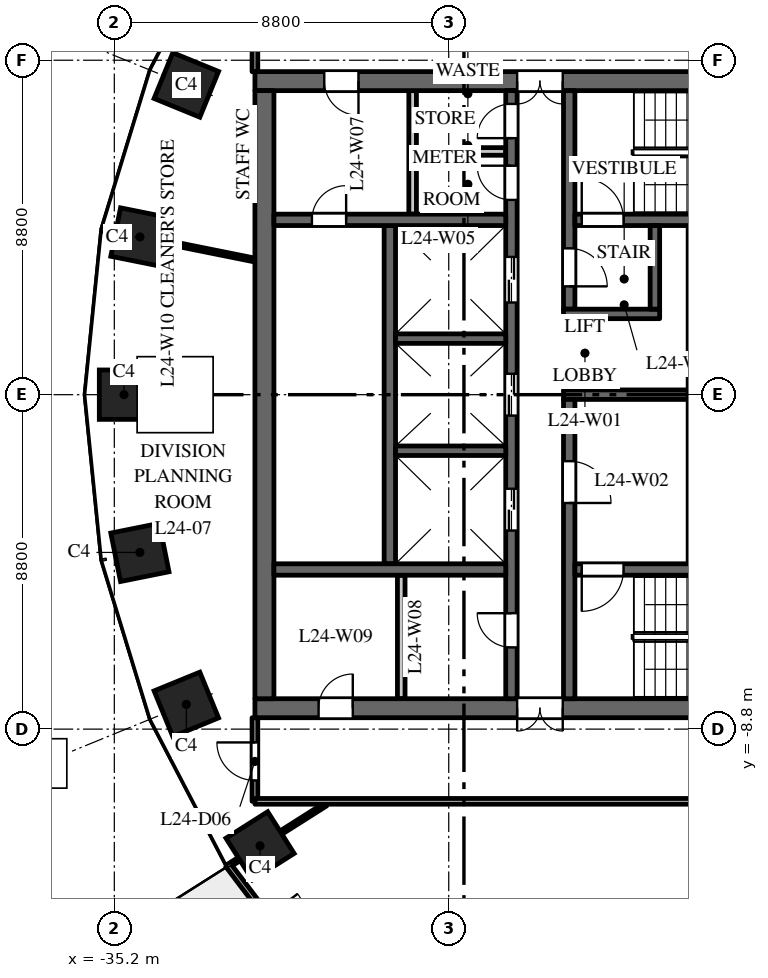
"""IFC4 building model, lengths in metres.
Left out: names, types, materials, properties, quantities, classifications, styles, units other than length and angle.
Written with IfcOpenShell. Run it as: python <this file> out.ifc"""

import sys

from ifc_helpers import new_model, si_unit, direction, frame, frame_2d, origin, origin_2d, place, context, subcontext, project, spatial, rectangle, extrude, element, fill, save


model = new_model("IFC4")
c1 = context("Model", 3, precision=1e-05, world=origin(), true_north=direction((0.0, 1.0)))
c2 = subcontext(c1, "Body", "Model", "MODEL_VIEW")
j1 = project(units=[si_unit("LENGTHUNIT", "METRE"), si_unit("PLANEANGLEUNIT", "RADIAN")], contexts=[c1])
p1 = place(None, origin())
s1 = spatial("IfcSite", under=j1, at=p1, CompositionType="ELEMENT")
p2 = place(p1, origin())
s2 = spatial("IfcBuilding", under=s1, at=p2, CompositionType="ELEMENT")
p3 = place(p2, frame((0.0, 0.0, 108.0)))
s3 = spatial("IfcBuildingStorey", under=s2, at=p3, CompositionType="ELEMENT", Elevation=108.0)
for number, where, z_axis, x_axis in (
    (1, (-33.305, 8.149, 0.0), (0.0, 0.0, 1.0), (-0.379, -0.925, 0.0)),
    (2, (-34.527, 4.151, 0.0), (0.0, 0.0, 1.0), (-0.197, -0.98, 0.0)),
    (3, (-34.945, 0.0, 0.0), (0.0, 0.0, 1.0), (0.0, -1.0, 0.0)),
    (4, (-34.527, -4.151, 0.0), (0.0, 0.0, 1.0), (0.197, -0.98, 0.0)),
    (5, (-33.305, -8.149, 0.0), (0.0, 0.0, 1.0), (0.379, -0.925, 0.0)),
    (6, (-31.365, -11.871, 0.0), (0.0, 0.0, 1.0), (0.535, -0.845, 0.0)),
):
    element("IfcColumn", number, at=place(p3, frame(where, z_axis=z_axis, x_axis=x_axis)), inside=s3, PredefinedType="COLUMN", context=c2, shape_type="SweptSolid", body=[
        extrude(rectangle(XDim=1.3, YDim=1.3, at=origin_2d()), origin(), (0.0, 0.0, 1.0), 4.0),
    ])
p4 = place(p3, frame((-16.5, 8.25, 0.0), z_axis=(0.0, 0.0, 1.0), x_axis=(-1.0, 0.0, 0.0)))
e7 = element("IfcWall", 7, at=p4, inside=s3, PredefinedType="SHEAR", context=c2, shape_type="SweptSolid", body=[
    extrude(rectangle(XDim=15.0, YDim=0.5, at=frame_2d((7.5, 0.0))), origin(), (0.0, 0.0, 1.0), 3.7),
])
p5 = place(p4, frame((6.9, 0.0, 0.0)))
e8 = element("IfcOpeningElement", 8, at=p5, cuts=e7, PredefinedType="OPENING", context=c2, shape_type="SweptSolid", body=[
    extrude(rectangle(XDim=1.2, YDim=2.1, at=frame_2d((0.6, 1.05))), frame((0.0, 0.26, 0.0), z_axis=(0.0, -1.0, 0.0), x_axis=(1.0, 0.0, 0.0)), (0.0, 0.0, 1.0), 0.52),
])
p6 = place(p4, frame((12.275, 0.0, 0.0)))
e9 = element("IfcOpeningElement", 9, at=p6, cuts=e7, PredefinedType="OPENING", context=c2, shape_type="SweptSolid", body=[
    extrude(rectangle(XDim=0.9, YDim=2.1, at=frame_2d((0.45, 1.05))), frame((0.0, 0.26, 0.0), z_axis=(0.0, -1.0, 0.0), x_axis=(1.0, 0.0, 0.0)), (0.0, 0.0, 1.0), 0.52),
])
p7 = place(p3, frame((-16.5, -8.25, 0.0), z_axis=(0.0, 0.0, 1.0), x_axis=(-1.0, 0.0, 0.0)))
e10 = element("IfcWall", 10, at=p7, inside=s3, PredefinedType="SHEAR", context=c2, shape_type="SweptSolid", body=[
    extrude(rectangle(XDim=15.0, YDim=0.5, at=frame_2d((7.5, 0.0))), origin(), (0.0, 0.0, 1.0), 3.7),
])
p8 = place(p7, frame((6.9, 0.0, 0.0)))
e11 = element("IfcOpeningElement", 11, at=p8, cuts=e10, PredefinedType="OPENING", context=c2, shape_type="SweptSolid", body=[
    extrude(rectangle(XDim=1.2, YDim=2.1, at=frame_2d((0.6, 1.05))), frame((0.0, 0.26, 0.0), z_axis=(0.0, -1.0, 0.0), x_axis=(1.0, 0.0, 0.0)), (0.0, 0.0, 1.0), 0.52),
])
p9 = place(p7, frame((12.425, 0.0, 0.0)))
e12 = element("IfcOpeningElement", 12, at=p9, cuts=e10, PredefinedType="OPENING", context=c2, shape_type="SweptSolid", body=[
    extrude(rectangle(XDim=0.9, YDim=2.1, at=frame_2d((0.45, 1.05))), frame((0.0, 0.26, 0.0), z_axis=(0.0, -1.0, 0.0), x_axis=(1.0, 0.0, 0.0)), (0.0, 0.0, 1.0), 0.52),
])
p10 = place(p3, frame((-27.95, -4.45, 0.0), z_axis=(0.0, 0.0, 1.0), x_axis=(0.0, 1.0, 0.0)))
e13 = element("IfcWall", 13, at=p10, inside=s3, PredefinedType="SHEAR", context=c2, shape_type="SweptSolid", body=[
    extrude(rectangle(XDim=8.9, YDim=0.3, at=frame_2d((4.45, 0.0))), origin(), (0.0, 0.0, 1.0), 3.7),
])
p11 = place(p3, frame((-24.75, -8.0, 0.0), z_axis=(0.0, 0.0, 1.0), x_axis=(0.0, 1.0, 0.0)))
e14 = element("IfcWall", 14, at=p11, inside=s3, PredefinedType="SHEAR", context=c2, shape_type="SweptSolid", body=[
    extrude(rectangle(XDim=16.0, YDim=0.3, at=frame_2d((8.0, 0.0))), origin(), (0.0, 0.0, 1.0), 3.7),
])
p12 = place(p11, frame((4.425, 0.0, 0.0)))
e15 = element("IfcOpeningElement", 15, at=p12, cuts=e14, PredefinedType="OPENING", context=c2, shape_type="SweptSolid", body=[
    extrude(rectangle(XDim=1.1, YDim=2.1, at=frame_2d((0.55, 1.05))), frame((0.0, 0.16, 0.0), z_axis=(0.0, -1.0, 0.0), x_axis=(1.0, 0.0, 0.0)), (0.0, 0.0, 1.0), 0.32),
])
p13 = place(p11, frame((7.45, 0.0, 0.0)))
e16 = element("IfcOpeningElement", 16, at=p13, cuts=e14, PredefinedType="OPENING", context=c2, shape_type="SweptSolid", body=[
    extrude(rectangle(XDim=1.1, YDim=2.1, at=frame_2d((0.55, 1.05))), frame((0.0, 0.16, 0.0), z_axis=(0.0, -1.0, 0.0), x_axis=(1.0, 0.0, 0.0)), (0.0, 0.0, 1.0), 0.32),
])
p14 = place(p11, frame((10.425, 0.0, 0.0)))
e17 = element("IfcOpeningElement", 17, at=p14, cuts=e14, PredefinedType="OPENING", context=c2, shape_type="SweptSolid", body=[
    extrude(rectangle(XDim=1.2, YDim=2.1, at=frame_2d((0.6, 1.05))), frame((0.0, 0.16, 0.0), z_axis=(0.0, -1.0, 0.0), x_axis=(1.0, 0.0, 0.0)), (0.0, 0.0, 1.0), 0.32),
])
p15 = place(p11, frame((13.125, 0.0, 0.0)))
e18 = element("IfcOpeningElement", 18, at=p15, cuts=e14, PredefinedType="OPENING", context=c2, shape_type="SweptSolid", body=[
    extrude(rectangle(XDim=0.9, YDim=2.1, at=frame_2d((0.45, 1.05))), frame((0.0, 0.16, 0.0), z_axis=(0.0, -1.0, 0.0), x_axis=(1.0, 0.0, 0.0)), (0.0, 0.0, 1.0), 0.32),
])
p16 = place(p11, frame((14.75, 0.0, 0.0)))
e19 = element("IfcOpeningElement", 19, at=p16, cuts=e14, PredefinedType="OPENING", context=c2, shape_type="SweptSolid", body=[
    extrude(rectangle(XDim=0.9, YDim=2.1, at=frame_2d((0.45, 1.05))), frame((0.0, 0.16, 0.0), z_axis=(0.0, -1.0, 0.0), x_axis=(1.0, 0.0, 0.0)), (0.0, 0.0, 1.0), 0.32),
])
p17 = place(p11, frame((1.35, 0.0, 0.0)))
e20 = element("IfcOpeningElement", 20, at=p17, cuts=e14, PredefinedType="OPENING", context=c2, shape_type="SweptSolid", body=[
    extrude(rectangle(XDim=0.9, YDim=2.1, at=frame_2d((0.45, 1.05))), frame((0.0, 0.16, 0.0), z_axis=(0.0, -1.0, 0.0), x_axis=(1.0, 0.0, 0.0)), (0.0, 0.0, 1.0), 0.32),
])
p18 = place(p3, frame((-20.1, 0.0, 0.0), z_axis=(0.0, 0.0, 1.0), x_axis=(-1.0, 0.0, 0.0)))
e21 = element("IfcWall", 21, at=p18, inside=s3, PredefinedType="SHEAR", context=c2, shape_type="SweptSolid", body=[
    extrude(rectangle(XDim=3.28, YDim=0.25, at=frame_2d((1.64, 0.0))), origin(), (0.0, 0.0, 1.0), 3.7),
])
p19 = place(p3, frame((-31.25, -8.0, 0.0), z_axis=(0.0, 0.0, 1.0), x_axis=(0.0, 1.0, 0.0)))
e22 = element("IfcWall", 22, at=p19, inside=s3, PredefinedType="SHEAR", context=c2, shape_type="SweptSolid", body=[
    extrude(rectangle(XDim=16.0, YDim=0.5, at=frame_2d((8.0, 0.0))), origin(), (0.0, 0.0, 1.0), 3.7),
])
p20 = place(p3, frame((-24.9, 4.6, 0.0), z_axis=(0.0, 0.0, 1.0), x_axis=(-1.0, 0.0, 0.0)))
e23 = element("IfcWall", 23, at=p20, inside=s3, PredefinedType="SHEAR", context=c2, shape_type="SweptSolid", body=[
    extrude(rectangle(XDim=6.1, YDim=0.3, at=frame_2d((3.05, 0.0))), origin(), (0.0, 0.0, 1.0), 3.7),
])
p21 = place(p20, frame((4.2, 0.0, 0.0)))
e24 = element("IfcOpeningElement", 24, at=p21, cuts=e23, PredefinedType="OPENING", context=c2, shape_type="SweptSolid", body=[
    extrude(rectangle(XDim=0.9, YDim=2.1, at=frame_2d((0.45, 1.05))), frame((0.0, 0.16, 0.0), z_axis=(0.0, -1.0, 0.0), x_axis=(1.0, 0.0, 0.0)), (0.0, 0.0, 1.0), 0.32),
])
for number, where, z_axis, x_axis in (
    (25, (-27.35, 4.75, 0.0), (0.0, 0.0, 1.0), (0.0, 1.0, 0.0)),
    (26, (-27.65, -8.0, 0.0), (0.0, 0.0, 1.0), (0.0, 1.0, 0.0)),
):
    element("IfcWall", number, at=place(p3, frame(where, z_axis=z_axis, x_axis=x_axis)), inside=s3, PredefinedType="PARTITIONING", context=c2, shape_type="SweptSolid", body=[
        extrude(rectangle(XDim=3.25, YDim=0.2, at=frame_2d((1.625, 0.0))), origin(), (0.0, 0.0, 1.0), 3.7),
    ])
p22 = place(p3, frame((-24.9, 6.4, 0.0), z_axis=(0.0, 0.0, 1.0), x_axis=(-1.0, 0.0, 0.0)))
e27 = element("IfcWall", 27, at=p22, inside=s3, PredefinedType="PARTITIONING", context=c2, shape_type="SweptSolid", body=[
    extrude(rectangle(XDim=2.35, YDim=0.2, at=frame_2d((1.175, 0.0))), origin(), (0.0, 0.0, 1.0), 3.7),
])
p23 = place(p3, frame((-24.9, -4.6, 0.0), z_axis=(0.0, 0.0, 1.0), x_axis=(-1.0, 0.0, 0.0)))
e28 = element("IfcWall", 28, at=p23, inside=s3, PredefinedType="SHEAR", context=c2, shape_type="SweptSolid", body=[
    extrude(rectangle(XDim=6.1, YDim=0.3, at=frame_2d((3.05, 0.0))), origin(), (0.0, 0.0, 1.0), 3.7),
])
for number, where, z_axis, x_axis in (
    (29, (-24.9, -1.475, 0.0), (0.0, 0.0, 1.0), (-1.0, 0.0, 0.0)),
    (30, (-24.9, 1.475, 0.0), (0.0, 0.0, 1.0), (-1.0, 0.0, 0.0)),
):
    element("IfcWall", number, at=place(p3, frame(where, z_axis=z_axis, x_axis=x_axis)), inside=s3, PredefinedType="SHEAR", context=c2, shape_type="SweptSolid", body=[
        extrude(rectangle(XDim=2.9, YDim=0.25, at=frame_2d((1.45, 0.0))), origin(), (0.0, 0.0, 1.0), 3.7),
    ])
p24 = place(p3, frame((-23.23, 2.25, 0.0), z_axis=(0.0, 0.0, 1.0), x_axis=(0.0, 1.0, 0.0)))
e31 = element("IfcWall", 31, at=p24, inside=s3, PredefinedType="SHEAR", context=c2, shape_type="SweptSolid", body=[
    extrude(rectangle(XDim=5.75, YDim=0.3, at=frame_2d((2.875, 0.0))), origin(), (0.0, 0.0, 1.0), 3.7),
])
p25 = place(p24, frame((0.6, 0.0, 0.0)))
e32 = element("IfcOpeningElement", 32, at=p25, cuts=e31, PredefinedType="OPENING", context=c2, shape_type="SweptSolid", body=[
    extrude(rectangle(XDim=1.0, YDim=2.1, at=frame_2d((0.5, 1.05))), frame((0.0, 0.16, 0.0), z_axis=(0.0, -1.0, 0.0), x_axis=(1.0, 0.0, 0.0)), (0.0, 0.0, 1.0), 0.32),
])
p26 = place(p3, frame((-23.23, -8.0, 0.0), z_axis=(0.0, 0.0, 1.0), x_axis=(0.0, 1.0, 0.0)))
e33 = element("IfcWall", 33, at=p26, inside=s3, PredefinedType="SHEAR", context=c2, shape_type="SweptSolid", body=[
    extrude(rectangle(XDim=7.875, YDim=0.3, at=frame_2d((3.938, 0.0))), origin(), (0.0, 0.0, 1.0), 3.7),
])
p27 = place(p26, frame((5.15, 0.0, 0.0)))
e34 = element("IfcOpeningElement", 34, at=p27, cuts=e33, PredefinedType="OPENING", context=c2, shape_type="SweptSolid", body=[
    extrude(rectangle(XDim=1.1, YDim=2.1, at=frame_2d((0.55, 1.05))), frame((0.0, 0.16, 0.0), z_axis=(0.0, -1.0, 0.0), x_axis=(1.0, 0.0, 0.0)), (0.0, 0.0, 1.0), 0.32),
])
p28 = place(p3, frame((-16.9, 4.6, 0.0), z_axis=(0.0, 0.0, 1.0), x_axis=(-1.0, 0.0, 0.0)))
e35 = element("IfcWall", 35, at=p28, inside=s3, PredefinedType="SHEAR", context=c2, shape_type="SweptSolid", body=[
    extrude(rectangle(XDim=6.18, YDim=0.3, at=frame_2d((3.09, 0.0))), origin(), (0.0, 0.0, 1.0), 3.7),
])
p29 = place(p28, frame((4.9, 0.0, 0.0)))
e36 = element("IfcOpeningElement", 36, at=p29, cuts=e35, PredefinedType="OPENING", context=c2, shape_type="SweptSolid", body=[
    extrude(rectangle(XDim=1.1, YDim=2.1, at=frame_2d((0.55, 1.05))), frame((0.0, 0.16, 0.0), z_axis=(0.0, -1.0, 0.0), x_axis=(1.0, 0.0, 0.0)), (0.0, 0.0, 1.0), 0.32),
])
p30 = place(p3, frame((-16.9, -4.6, 0.0), z_axis=(0.0, 0.0, 1.0), x_axis=(-1.0, 0.0, 0.0)))
e37 = element("IfcWall", 37, at=p30, inside=s3, PredefinedType="SHEAR", context=c2, shape_type="SweptSolid", body=[
    extrude(rectangle(XDim=6.18, YDim=0.3, at=frame_2d((3.09, 0.0))), origin(), (0.0, 0.0, 1.0), 3.7),
])
p31 = place(p30, frame((4.9, 0.0, 0.0)))
e38 = element("IfcOpeningElement", 38, at=p31, cuts=e37, PredefinedType="OPENING", context=c2, shape_type="SweptSolid", body=[
    extrude(rectangle(XDim=1.1, YDim=2.1, at=frame_2d((0.55, 1.05))), frame((0.0, 0.16, 0.0), z_axis=(0.0, -1.0, 0.0), x_axis=(1.0, 0.0, 0.0)), (0.0, 0.0, 1.0), 0.32),
])
p32 = place(p3, frame((-20.85, 2.125, 0.0), z_axis=(0.0, 0.0, 1.0), x_axis=(-1.0, 0.0, 0.0)))
e39 = element("IfcWall", 39, at=p32, inside=s3, PredefinedType="SHEAR", context=c2, shape_type="SweptSolid", body=[
    extrude(rectangle(XDim=2.53, YDim=0.25, at=frame_2d((1.265, 0.0))), origin(), (0.0, 0.0, 1.0), 3.7),
])
p33 = place(p3, frame((-20.975, 2.25, 0.0), z_axis=(0.0, 0.0, 1.0), x_axis=(0.0, 1.0, 0.0)))
e40 = element("IfcWall", 40, at=p33, inside=s3, PredefinedType="SHEAR", context=c2, shape_type="SweptSolid", body=[
    extrude(rectangle(XDim=2.2, YDim=0.25, at=frame_2d((1.1, 0.0))), origin(), (0.0, 0.0, 1.0), 3.7),
])
p34 = place(p3, frame((-32.208, -12.374, 0.0), z_axis=(0.0, 0.0, 1.0), x_axis=(0.604045763106, -0.796949632081, 0.0)))
e41 = element("IfcWall", 41, at=p34, inside=s3, PredefinedType="STANDARD", context=c2, shape_type="SweptSolid", body=[
    extrude(rectangle(XDim=4.423, YDim=0.15, at=frame_2d((2.212, 0.0))), origin(), (0.0, 0.0, 1.0), 3.7),
])
p35 = place(p34, frame((1.712, 0.0, 0.0)))
e42 = element("IfcOpeningElement", 42, at=p35, cuts=e41, PredefinedType="OPENING", context=c2, shape_type="SweptSolid", body=[
    extrude(rectangle(XDim=1.0, YDim=2.4, at=frame_2d((0.5, 1.2))), frame((0.0, 0.085, 0.0), z_axis=(0.0, -1.0, 0.0), x_axis=(1.0, 0.0, 0.0)), (0.0, 0.0, 1.0), 0.17),
])
p36 = place(p3, frame((-35.512, 4.349, 0.0), z_axis=(0.0, 0.0, 1.0), x_axis=(0.980357474535, -0.197228857227, 0.0)))
e43 = element("IfcWall", 43, at=p36, inside=s3, PredefinedType="PARTITIONING", context=c2, shape_type="SweptSolid", body=[
    extrude(rectangle(XDim=4.092, YDim=0.1, at=frame_2d((2.046, 0.0))), origin(), (0.0, 0.0, 1.0), 3.2),
])
p37 = place(p3, frame((-32.212, -12.408, 0.0), z_axis=(0.0, 0.0, 1.0), x_axis=(0.844810627195, 0.535065420467, 0.0)))
e44 = element("IfcWall", 44, at=p37, inside=s3, PredefinedType="PARTITIONING", context=c2, shape_type="SweptSolid", body=[
    extrude(rectangle(XDim=3.048, YDim=0.1, at=frame_2d((1.524, 0.0))), origin(), (0.0, 0.0, 1.0), 3.7),
])
p38 = place(p3, frame((-31.5, -10.7, 0.0), z_axis=(0.0, 0.0, 1.0), x_axis=(0.0, 1.0, 0.0)))
e45 = element("IfcWall", 45, at=p38, inside=s3, PredefinedType="PARTITIONING", context=c2, shape_type="SweptSolid", body=[
    extrude(rectangle(XDim=2.2, YDim=0.15, at=frame_2d((1.1, 0.0))), origin(), (0.0, 0.0, 1.0), 3.7),
])
p39 = place(p38, frame((0.55, 0.0, 0.0)))
e46 = element("IfcOpeningElement", 46, at=p39, cuts=e45, PredefinedType="OPENING", context=c2, shape_type="SweptSolid", body=[
    extrude(rectangle(XDim=1.0, YDim=2.1, at=frame_2d((0.5, 1.05))), frame((0.0, 0.085, 0.0), z_axis=(0.0, -1.0, 0.0), x_axis=(1.0, 0.0, 0.0)), (0.0, 0.0, 1.0), 0.17),
])
p40 = place(p3, frame((-31.5, -10.7, 0.0), z_axis=(0.0, 0.0, 1.0), x_axis=(1.0, 0.0, 0.0)))
e47 = element("IfcWall", 47, at=p40, inside=s3, PredefinedType="PARTITIONING", context=c2, shape_type="SweptSolid", body=[
    extrude(rectangle(XDim=15.0, YDim=0.15, at=frame_2d((7.5, 0.0))), origin(), (0.0, 0.0, 1.0), 3.1),
])
p41 = place(p40, frame((13.379, 0.0, 0.0)))
e48 = element("IfcOpeningElement", 48, at=p41, cuts=e47, PredefinedType="OPENING", context=c2, shape_type="SweptSolid", body=[
    extrude(rectangle(XDim=1.0, YDim=2.1, at=frame_2d((0.5, 1.05))), frame((0.0, 0.085, 0.0), z_axis=(0.0, -1.0, 0.0), x_axis=(1.0, 0.0, 0.0)), (0.0, 0.0, 1.0), 0.17),
])
p42 = place(p3, frame((-31.5, 8.5, 0.0), z_axis=(0.0, 0.0, 1.0), x_axis=(0.0, 1.0, 0.0)))
e49 = element("IfcWall", 49, at=p42, inside=s3, PredefinedType="PARTITIONING", context=c2, shape_type="SweptSolid", body=[
    extrude(rectangle(XDim=2.2, YDim=0.15, at=frame_2d((1.1, 0.0))), origin(), (0.0, 0.0, 1.0), 3.7),
])
p43 = place(p12, origin())
e50 = element("IfcDoor", 50, at=p43, inside=s3, OperationType="DOUBLE_DOOR_SLIDING", PredefinedType="DOOR", context=c2, shape_type="SweptSolid", body=[
    extrude(rectangle(XDim=1.1, YDim=2.1, at=frame_2d((0.55, 1.05))), frame((0.0, 0.025, 0.0), z_axis=(0.0, -1.0, 0.0), x_axis=(1.0, 0.0, 0.0)), (0.0, 0.0, 1.0), 0.05),
])
fill(e15, e50)
p44 = place(p13, origin())
e51 = element("IfcDoor", 51, at=p44, inside=s3, OperationType="DOUBLE_DOOR_SLIDING", PredefinedType="DOOR", context=c2, shape_type="SweptSolid", body=[
    extrude(rectangle(XDim=1.1, YDim=2.1, at=frame_2d((0.55, 1.05))), frame((0.0, 0.025, 0.0), z_axis=(0.0, -1.0, 0.0), x_axis=(1.0, 0.0, 0.0)), (0.0, 0.0, 1.0), 0.05),
])
fill(e16, e51)
p45 = place(p14, origin())
e52 = element("IfcDoor", 52, at=p45, inside=s3, OperationType="DOUBLE_DOOR_SLIDING", PredefinedType="DOOR", context=c2, shape_type="SweptSolid", body=[
    extrude(rectangle(XDim=1.2, YDim=2.1, at=frame_2d((0.6, 1.05))), frame((0.0, 0.025, 0.0), z_axis=(0.0, -1.0, 0.0), x_axis=(1.0, 0.0, 0.0)), (0.0, 0.0, 1.0), 0.05),
])
fill(e17, e52)
p46 = place(p29, origin())
e53 = element("IfcDoor", 53, at=p46, inside=s3, OperationType="SINGLE_SWING_RIGHT", PredefinedType="DOOR", context=c2, shape_type="SweptSolid", body=[
    extrude(rectangle(XDim=1.1, YDim=2.1, at=frame_2d((0.55, 1.05))), frame((0.0, 0.025, 0.0), z_axis=(0.0, -1.0, 0.0), x_axis=(1.0, 0.0, 0.0)), (0.0, 0.0, 1.0), 0.05),
])
fill(e36, e53)
p47 = place(p31, origin())
e54 = element("IfcDoor", 54, at=p47, inside=s3, OperationType="SINGLE_SWING_LEFT", PredefinedType="DOOR", context=c2, shape_type="SweptSolid", body=[
    extrude(rectangle(XDim=1.1, YDim=2.1, at=frame_2d((0.55, 1.05))), frame((0.0, 0.025, 0.0), z_axis=(0.0, -1.0, 0.0), x_axis=(1.0, 0.0, 0.0)), (0.0, 0.0, 1.0), 0.05),
])
fill(e38, e54)
p48 = place(p27, origin())
e55 = element("IfcDoor", 55, at=p48, inside=s3, OperationType="SINGLE_SWING_LEFT", PredefinedType="DOOR", context=c2, shape_type="SweptSolid", body=[
    extrude(rectangle(XDim=1.1, YDim=2.1, at=frame_2d((0.55, 1.05))), frame((0.0, 0.025, 0.0), z_axis=(0.0, -1.0, 0.0), x_axis=(1.0, 0.0, 0.0)), (0.0, 0.0, 1.0), 0.05),
])
fill(e34, e55)
p49 = place(p25, origin())
e56 = element("IfcDoor", 56, at=p49, inside=s3, OperationType="SINGLE_SWING_LEFT", PredefinedType="DOOR", context=c2, shape_type="SweptSolid", body=[
    extrude(rectangle(XDim=1.0, YDim=2.1, at=frame_2d((0.5, 1.05))), frame((0.0, 0.025, 0.0), z_axis=(0.0, -1.0, 0.0), x_axis=(1.0, 0.0, 0.0)), (0.0, 0.0, 1.0), 0.05),
])
fill(e32, e56)
p50 = place(p5, origin())
e57 = element("IfcDoor", 57, at=p50, inside=s3, OperationType="DOUBLE_DOOR_DOUBLE_SWING", PredefinedType="DOOR", context=c2, shape_type="SweptSolid", body=[
    extrude(rectangle(XDim=1.2, YDim=2.1, at=frame_2d((0.6, 1.05))), frame((0.0, 0.025, 0.0), z_axis=(0.0, -1.0, 0.0), x_axis=(1.0, 0.0, 0.0)), (0.0, 0.0, 1.0), 0.05),
])
fill(e8, e57)
p51 = place(p8, origin())
e58 = element("IfcDoor", 58, at=p51, inside=s3, OperationType="DOUBLE_DOOR_DOUBLE_SWING", PredefinedType="DOOR", context=c2, shape_type="SweptSolid", body=[
    extrude(rectangle(XDim=1.2, YDim=2.1, at=frame_2d((0.6, 1.05))), frame((0.0, 0.025, 0.0), z_axis=(0.0, -1.0, 0.0), x_axis=(1.0, 0.0, 0.0)), (0.0, 0.0, 1.0), 0.05),
])
fill(e11, e58)
p52 = place(p15, origin())
e59 = element("IfcDoor", 59, at=p52, inside=s3, OperationType="SINGLE_SWING_LEFT", PredefinedType="DOOR", context=c2, shape_type="SweptSolid", body=[
    extrude(rectangle(XDim=0.9, YDim=2.1, at=frame_2d((0.45, 1.05))), frame((0.0, 0.025, 0.0), z_axis=(0.0, -1.0, 0.0), x_axis=(1.0, 0.0, 0.0)), (0.0, 0.0, 1.0), 0.05),
])
fill(e18, e59)
p53 = place(p16, origin())
e60 = element("IfcDoor", 60, at=p53, inside=s3, OperationType="SINGLE_SWING_RIGHT", PredefinedType="DOOR", context=c2, shape_type="SweptSolid", body=[
    extrude(rectangle(XDim=0.9, YDim=2.1, at=frame_2d((0.45, 1.05))), frame((0.0, 0.025, 0.0), z_axis=(0.0, -1.0, 0.0), x_axis=(1.0, 0.0, 0.0)), (0.0, 0.0, 1.0), 0.05),
])
fill(e19, e60)
p54 = place(p6, origin())
e61 = element("IfcDoor", 61, at=p54, inside=s3, OperationType="SINGLE_SWING_RIGHT", PredefinedType="DOOR", context=c2, shape_type="SweptSolid", body=[
    extrude(rectangle(XDim=0.9, YDim=2.1, at=frame_2d((0.45, 1.05))), frame((0.0, 0.025, 0.0), z_axis=(0.0, -1.0, 0.0), x_axis=(1.0, 0.0, 0.0)), (0.0, 0.0, 1.0), 0.05),
])
fill(e9, e61)
p55 = place(p17, origin())
e62 = element("IfcDoor", 62, at=p55, inside=s3, OperationType="SINGLE_SWING_LEFT", PredefinedType="DOOR", context=c2, shape_type="SweptSolid", body=[
    extrude(rectangle(XDim=0.9, YDim=2.1, at=frame_2d((0.45, 1.05))), frame((0.0, 0.025, 0.0), z_axis=(0.0, -1.0, 0.0), x_axis=(1.0, 0.0, 0.0)), (0.0, 0.0, 1.0), 0.05),
])
fill(e20, e62)
p56 = place(p9, origin())
e63 = element("IfcDoor", 63, at=p56, inside=s3, OperationType="SINGLE_SWING_LEFT", PredefinedType="DOOR", context=c2, shape_type="SweptSolid", body=[
    extrude(rectangle(XDim=0.9, YDim=2.1, at=frame_2d((0.45, 1.05))), frame((0.0, 0.025, 0.0), z_axis=(0.0, -1.0, 0.0), x_axis=(1.0, 0.0, 0.0)), (0.0, 0.0, 1.0), 0.05),
])
fill(e12, e63)
p57 = place(p21, origin())
e64 = element("IfcDoor", 64, at=p57, inside=s3, OperationType="SINGLE_SWING_LEFT", PredefinedType="DOOR", context=c2, shape_type="SweptSolid", body=[
    extrude(rectangle(XDim=0.9, YDim=2.1, at=frame_2d((0.45, 1.05))), frame((0.0, 0.025, 0.0), z_axis=(0.0, -1.0, 0.0), x_axis=(1.0, 0.0, 0.0)), (0.0, 0.0, 1.0), 0.05),
])
fill(e24, e64)
p58 = place(p39, origin())
e65 = element("IfcDoor", 65, at=p58, inside=s3, OperationType="SINGLE_SWING_RIGHT", PredefinedType="DOOR", context=c2, shape_type="SweptSolid", body=[
    extrude(rectangle(XDim=1.0, YDim=2.1, at=frame_2d((0.5, 1.05))), frame((0.0, 0.025, 0.0), z_axis=(0.0, -1.0, 0.0), x_axis=(1.0, 0.0, 0.0)), (0.0, 0.0, 1.0), 0.05),
])
fill(e46, e65)
save(model, sys.argv[1])
